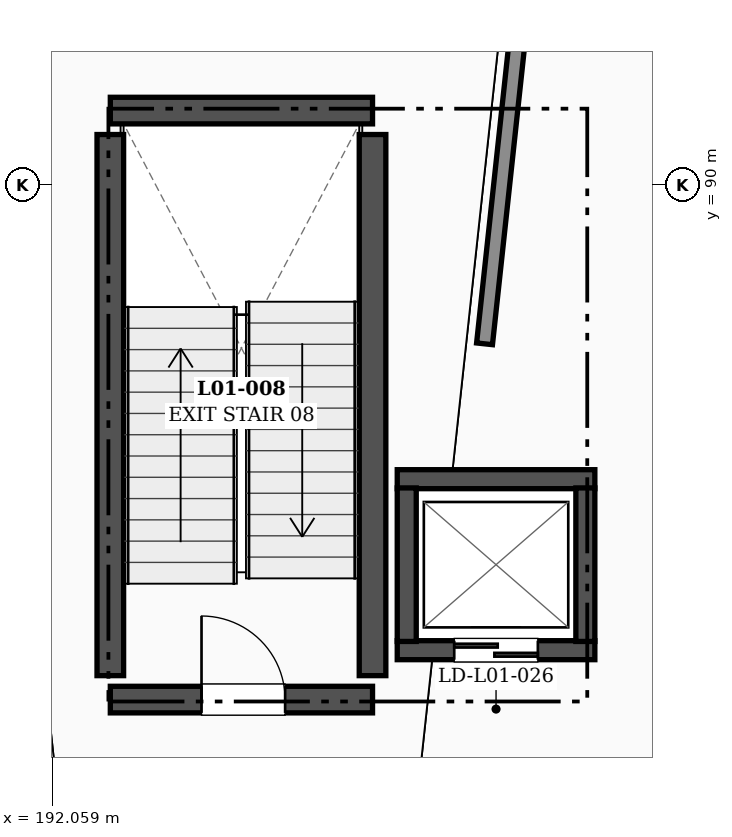
"""IFC4 building model, lengths in metres.
Left out: names, types, materials, properties, quantities, classifications, styles, units other than length and angle.
Written with IfcOpenShell. Run it as: python <this file> out.ifc"""

import sys

from ifc_helpers import new_model, si_unit, direction, frame, frame_2d, origin, place, context, subcontext, project, spatial, rectangle, extrude, element, fill, save


model = new_model("IFC4")
c1 = context("Model", 3, precision=1e-05, world=origin(), true_north=direction((0.0, 1.0)))
c2 = subcontext(c1, "Body", "Model", "MODEL_VIEW")
j1 = project(units=[si_unit("LENGTHUNIT", "METRE"), si_unit("PLANEANGLEUNIT", "RADIAN")], contexts=[c1])
p1 = place(None, origin())
s1 = spatial("IfcSite", under=j1, at=p1, CompositionType="ELEMENT")
p2 = place(p1, origin())
s2 = spatial("IfcBuilding", under=s1, at=p2, CompositionType="ELEMENT")
p3 = place(p2, frame((0.0, 0.0, 6.0)))
s3 = spatial("IfcBuildingStorey", under=s2, at=p3, CompositionType="ELEMENT", Elevation=6.0)
p4 = place(p3, frame((205.371, 90.653, 0.0), z_axis=(0.0, 0.0, 1.0), x_axis=(-0.794325535109, 0.607492340918, 0.0)))
e1 = element("IfcWall", 1, at=p4, inside=s3, PredefinedType="SOLIDWALL", context=c2, shape_type="SweptSolid", body=[
    extrude(rectangle(XDim=8.583, YDim=0.26, at=frame_2d((4.291, 0.0))), origin(), (0.0, 0.0, 1.0), 3.81),
])
p5 = place(p4, frame((3.341, 0.0, 1.0)))
e2 = element("IfcOpeningElement", 2, at=p5, cuts=e1, PredefinedType="OPENING", context=c2, shape_type="SweptSolid", body=[
    extrude(rectangle(XDim=1.9, YDim=1.9, at=frame_2d((0.95, 0.95))), frame((0.0, 0.14, 0.0), z_axis=(0.0, -1.0, 0.0), x_axis=(1.0, 0.0, 0.0)), (0.0, 0.0, 1.0), 0.28),
])
p6 = place(p3, frame((192.825, 83.225, 0.0), z_axis=(0.0, 0.0, 1.0), x_axis=(1.0, 0.0, 0.0)))
e3 = element("IfcWall", 3, at=p6, inside=s3, PredefinedType="SHEAR", context=c2, shape_type="SweptSolid", body=[
    extrude(rectangle(XDim=3.45, YDim=0.35, at=frame_2d((1.725, 0.0))), origin(), (0.0, 0.0, 1.0), 4.8),
])
p7 = place(p6, frame((1.2, 0.0, 0.0)))
e4 = element("IfcOpeningElement", 4, at=p7, cuts=e3, PredefinedType="OPENING", context=c2, shape_type="SweptSolid", body=[
    extrude(rectangle(XDim=1.1, YDim=2.2, at=frame_2d((0.55, 1.1))), frame((0.0, 0.185, 0.0), z_axis=(0.0, -1.0, 0.0), x_axis=(1.0, 0.0, 0.0)), (0.0, 0.0, 1.0), 0.37),
])
p8 = place(p3, frame((192.825, 90.975, 0.0), z_axis=(0.0, 0.0, 1.0), x_axis=(1.0, 0.0, 0.0)))
e5 = element("IfcWall", 5, at=p8, inside=s3, PredefinedType="SHEAR", context=c2, shape_type="SweptSolid", body=[
    extrude(rectangle(XDim=3.45, YDim=0.35, at=frame_2d((1.725, 0.0))), origin(), (0.0, 0.0, 1.0), 4.8),
])
for number, where, z_axis, x_axis in (
    (6, (192.825, 83.54, 0.0), (0.0, 0.0, 1.0), (0.0, 1.0, 0.0)),
    (7, (196.275, 83.54, 0.0), (0.0, 0.0, 1.0), (0.0, 1.0, 0.0)),
):
    element("IfcWall", number, at=place(p3, frame(where, z_axis=z_axis, x_axis=x_axis)), inside=s3, PredefinedType="SHEAR", context=c2, shape_type="SweptSolid", body=[
        extrude(rectangle(XDim=7.12, YDim=0.35, at=frame_2d((3.56, 0.0))), origin(), (0.0, 0.0, 1.0), 4.8),
    ])
p9 = place(p3, frame((196.6, 83.875, 0.0), z_axis=(0.0, 0.0, 1.0), x_axis=(1.0, 0.0, 0.0)))
e8 = element("IfcWall", 8, at=p9, inside=s3, PredefinedType="SHEAR", context=c2, shape_type="SweptSolid", body=[
    extrude(rectangle(XDim=2.6, YDim=0.25, at=frame_2d((1.3, 0.0))), origin(), (0.0, 0.0, 1.0), 4.8),
])
p10 = place(p9, frame((0.75, 0.0, 0.0)))
e9 = element("IfcOpeningElement", 9, at=p10, cuts=e8, PredefinedType="OPENING", context=c2, shape_type="SweptSolid", body=[
    extrude(rectangle(XDim=1.1, YDim=2.2, at=frame_2d((0.55, 1.1))), frame((0.0, 0.135, 0.0), z_axis=(0.0, -1.0, 0.0), x_axis=(1.0, 0.0, 0.0)), (0.0, 0.0, 1.0), 0.27),
])
p11 = place(p3, frame((196.6, 86.125, 0.0), z_axis=(0.0, 0.0, 1.0), x_axis=(1.0, 0.0, 0.0)))
e10 = element("IfcWall", 10, at=p11, inside=s3, PredefinedType="SHEAR", context=c2, shape_type="SweptSolid", body=[
    extrude(rectangle(XDim=2.6, YDim=0.25, at=frame_2d((1.3, 0.0))), origin(), (0.0, 0.0, 1.0), 4.8),
])
for number, where, z_axis, x_axis in (
    (11, (196.725, 83.99, 0.0), (0.0, 0.0, 1.0), (0.0, 1.0, 0.0)),
    (12, (199.075, 83.99, 0.0), (0.0, 0.0, 1.0), (0.0, 1.0, 0.0)),
):
    element("IfcWall", number, at=place(p3, frame(where, z_axis=z_axis, x_axis=x_axis)), inside=s3, PredefinedType="SHEAR", context=c2, shape_type="SweptSolid", body=[
        extrude(rectangle(XDim=2.02, YDim=0.25, at=frame_2d((1.01, 0.0))), origin(), (0.0, 0.0, 1.0), 4.8),
    ])
p12 = place(p3, frame((197.749, 87.906, 0.0), z_axis=(0.0, 0.0, 1.0), x_axis=(0.107124111103, 0.994245656174, 0.0)))
e13 = element("IfcWall", 13, at=p12, inside=s3, PredefinedType="PARTITIONING", context=c2, shape_type="SweptSolid", body=[
    extrude(rectangle(XDim=6.053, YDim=0.21, at=frame_2d((3.027, 0.0))), origin(), (0.0, 0.0, 1.0), 3.76),
])
p13 = place(p7, origin())
e14 = element("IfcDoor", 14, at=p13, inside=s3, OperationType="SINGLE_SWING_LEFT", PredefinedType="DOOR", context=c2, shape_type="SweptSolid", body=[
    extrude(rectangle(XDim=1.1, YDim=2.2, at=frame_2d((0.55, 1.1))), frame((0.0, 0.025, 0.0), z_axis=(0.0, -1.0, 0.0), x_axis=(1.0, 0.0, 0.0)), (0.0, 0.0, 1.0), 0.05),
])
fill(e4, e14)
p14 = place(p10, origin())
e15 = element("IfcDoor", 15, at=p14, inside=s3, OperationType="DOUBLE_DOOR_SLIDING", PredefinedType="DOOR", context=c2, shape_type="SweptSolid", body=[
    extrude(rectangle(XDim=1.1, YDim=2.2, at=frame_2d((0.55, 1.1))), frame((0.0, 0.025, 0.0), z_axis=(0.0, -1.0, 0.0), x_axis=(1.0, 0.0, 0.0)), (0.0, 0.0, 1.0), 0.05),
])
fill(e9, e15)
save(model, sys.argv[1])
